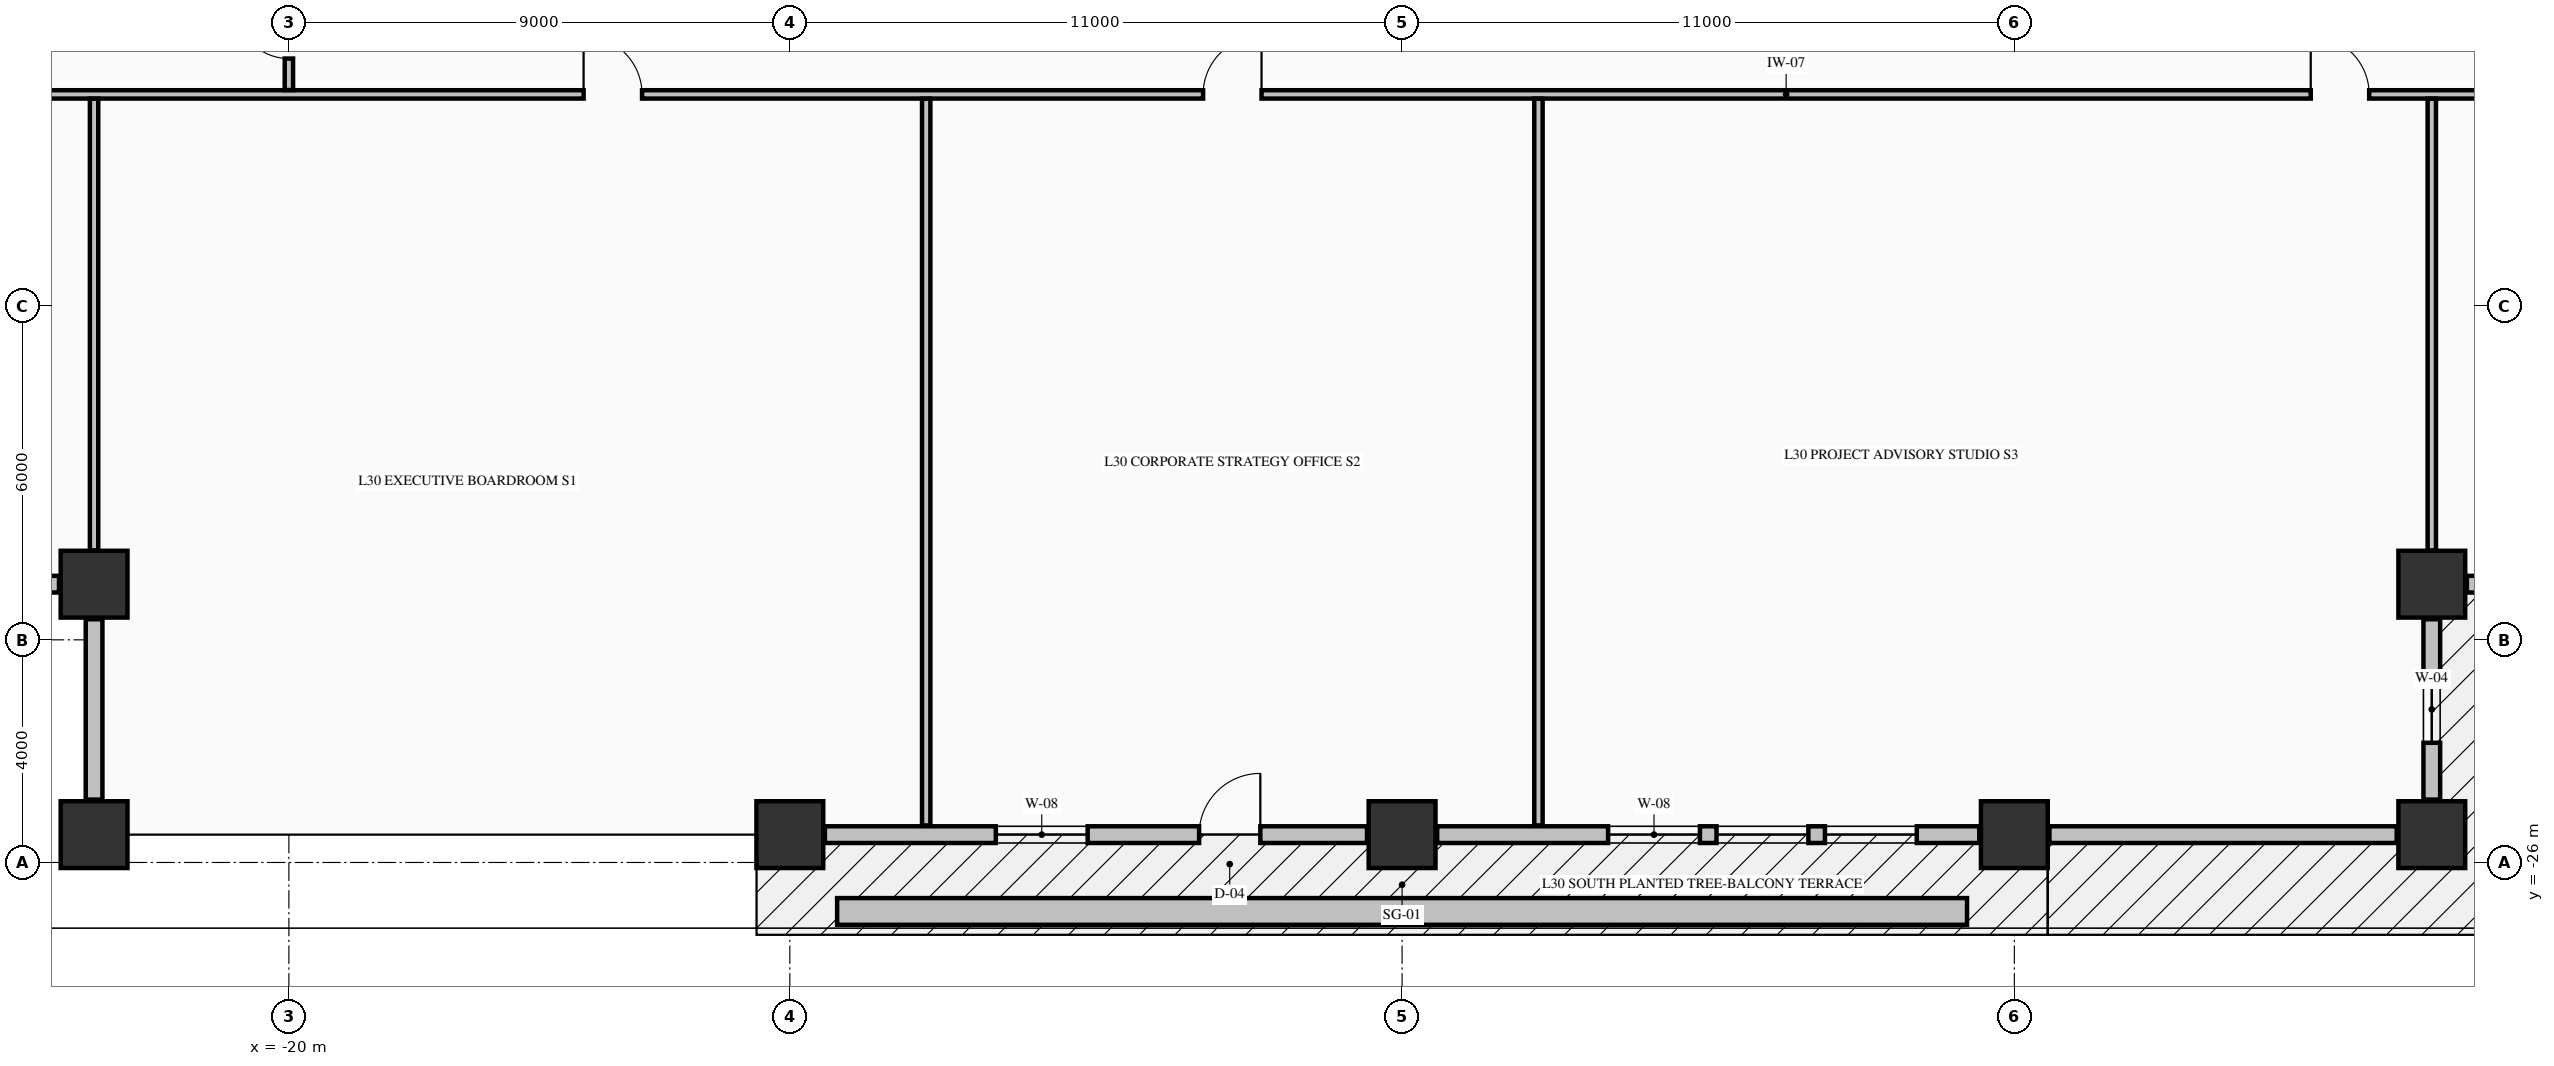
"""IFC4 building model, lengths in metres.
Left out: names, types, materials, properties, quantities, classifications, styles, units other than length and angle.
Written with IfcOpenShell. Run it as: python <this file> out.ifc"""

import sys

from ifc_helpers import new_model, si_unit, direction, frame, frame_2d, origin, origin_2d, place, context, subcontext, project, spatial, rectangle, extrude, element, fill, save


model = new_model("IFC4")
c1 = context("Model", 3, precision=1e-05, world=origin(), true_north=direction((0.0, 1.0)))
c2 = subcontext(c1, "Body", "Model", "MODEL_VIEW")
j1 = project(units=[si_unit("LENGTHUNIT", "METRE"), si_unit("PLANEANGLEUNIT", "RADIAN")], contexts=[c1])
p1 = place(None, origin())
s1 = spatial("IfcSite", under=j1, at=p1, CompositionType="ELEMENT")
p2 = place(p1, origin())
s2 = spatial("IfcBuilding", under=s1, at=p2, CompositionType="ELEMENT")
p3 = place(p2, frame((0.0, 0.0, 121.35)))
s3 = spatial("IfcBuildingStorey", under=s2, at=p3, CompositionType="ELEMENT", Elevation=121.35)
for number, where, z_axis, x_axis in (
    (1, (-23.5, -25.5, -0.425), (0.0, 0.0, 1.0), (1.0, 0.0, 0.0)),
    (2, (-11.0, -25.5, -0.425), (0.0, 0.0, 1.0), (1.0, 0.0, 0.0)),
    (3, (0.0, -25.5, -0.425), (0.0, 0.0, 1.0), (1.0, 0.0, 0.0)),
    (4, (11.0, -25.5, -0.425), (0.0, 0.0, 1.0), (1.0, 0.0, 0.0)),
    (5, (18.5, -25.5, -0.425), (0.0, 0.0, 1.0), (1.0, 0.0, 0.0)),
    (6, (-23.5, -21.0, -0.425), (0.0, 0.0, 1.0), (1.0, 0.0, 0.0)),
    (7, (18.5, -21.0, -0.425), (0.0, 0.0, 1.0), (1.0, 0.0, 0.0)),
):
    element("IfcColumn", number, at=place(p3, frame(where, z_axis=z_axis, x_axis=x_axis)), inside=s3, PredefinedType="COLUMN", context=c2, shape_type="SweptSolid", body=[
        extrude(rectangle(XDim=1.2, YDim=1.2, at=origin_2d()), origin(), (0.0, 0.0, 1.0), 3.745),
    ])
p4 = place(p3, frame((18.5, -24.87, 0.0), z_axis=(0.0, 0.0, 1.0), x_axis=(0.0, 1.0, 0.0)))
e8 = element("IfcWall", 8, at=p4, inside=s3, PredefinedType="STANDARD", context=c2, shape_type="SweptSolid", body=[
    extrude(rectangle(XDim=3.24, YDim=0.3, at=frame_2d((1.62, 0.0))), origin(), (0.0, 0.0, 1.0), 2.712),
])
p5 = place(p4, frame((1.02, 0.0, 0.82)))
e9 = element("IfcOpeningElement", 9, at=p5, cuts=e8, PredefinedType="OPENING", context=c2, shape_type="SweptSolid", body=[
    extrude(rectangle(XDim=1.2, YDim=1.65, at=frame_2d((0.6, 0.825))), frame((0.0, 0.16, 0.0), z_axis=(0.0, -1.0, 0.0), x_axis=(1.0, 0.0, 0.0)), (0.0, 0.0, 1.0), 0.32),
])
p6 = place(p3, frame((19.13, -21.0, 0.0), z_axis=(0.0, 0.0, 1.0), x_axis=(1.0, 0.0, 0.0)))
e10 = element("IfcWall", 10, at=p6, inside=s3, PredefinedType="STANDARD", context=c2, shape_type="SweptSolid", body=[
    extrude(rectangle(XDim=3.24, YDim=0.3, at=frame_2d((1.62, 0.0))), origin(), (0.0, 0.0, 1.0), 2.712),
])
p7 = place(p6, frame((1.02, 0.0, 0.82)))
e11 = element("IfcOpeningElement", 11, at=p7, cuts=e10, PredefinedType="OPENING", context=c2, shape_type="SweptSolid", body=[
    extrude(rectangle(XDim=1.2, YDim=1.65, at=frame_2d((0.6, 0.825))), frame((0.0, 0.16, 0.0), z_axis=(0.0, -1.0, 0.0), x_axis=(1.0, 0.0, 0.0)), (0.0, 0.0, 1.0), 0.32),
])
for number, where, z_axis, x_axis in (
    (12, (-27.37, -21.0, 0.0), (0.0, 0.0, 1.0), (1.0, 0.0, 0.0)),
    (13, (-23.5, -21.63, 0.0), (0.0, 0.0, 1.0), (0.0, -1.0, 0.0)),
):
    element("IfcWall", number, at=place(p3, frame(where, z_axis=z_axis, x_axis=x_axis)), inside=s3, PredefinedType="STANDARD", context=c2, shape_type="SweptSolid", body=[
        extrude(rectangle(XDim=3.24, YDim=0.3, at=frame_2d((1.62, 0.0))), origin(), (0.0, 0.0, 1.0), 1.512),
    ])
p8 = place(p3, frame((-10.37, -25.5, 0.0), z_axis=(0.0, 0.0, 1.0), x_axis=(1.0, 0.0, 0.0)))
e14 = element("IfcWall", 14, at=p8, inside=s3, PredefinedType="STANDARD", context=c2, shape_type="SweptSolid", body=[
    extrude(rectangle(XDim=9.74, YDim=0.3, at=frame_2d((4.87, 0.0))), origin(), (0.0, 0.0, 1.0), 2.712),
])
p9 = place(p8, frame((6.723, 0.0, 0.0)))
e15 = element("IfcOpeningElement", 15, at=p9, cuts=e14, PredefinedType="OPENING", context=c2, shape_type="SweptSolid", body=[
    extrude(rectangle(XDim=1.1, YDim=2.15, at=frame_2d((0.55, 1.075))), frame((0.0, 0.16, 0.0), z_axis=(0.0, -1.0, 0.0), x_axis=(1.0, 0.0, 0.0)), (0.0, 0.0, 1.0), 0.32),
])
p10 = place(p8, frame((3.071, 0.0, 0.8)))
e16 = element("IfcOpeningElement", 16, at=p10, cuts=e14, PredefinedType="OPENING", context=c2, shape_type="SweptSolid", body=[
    extrude(rectangle(XDim=1.65, YDim=1.7, at=frame_2d((0.825, 0.85))), frame((0.0, 0.16, 0.0), z_axis=(0.0, -1.0, 0.0), x_axis=(1.0, 0.0, 0.0)), (0.0, 0.0, 1.0), 0.32),
])
p11 = place(p3, frame((0.63, -25.5, 0.0), z_axis=(0.0, 0.0, 1.0), x_axis=(1.0, 0.0, 0.0)))
e17 = element("IfcWall", 17, at=p11, inside=s3, PredefinedType="STANDARD", context=c2, shape_type="SweptSolid", body=[
    extrude(rectangle(XDim=9.74, YDim=0.3, at=frame_2d((4.87, 0.0))), origin(), (0.0, 0.0, 1.0), 2.712),
])
p12 = place(p11, frame((3.071, 0.0, 0.8)))
e18 = element("IfcOpeningElement", 18, at=p12, cuts=e17, PredefinedType="OPENING", context=c2, shape_type="SweptSolid", body=[
    extrude(rectangle(XDim=1.65, YDim=1.7, at=frame_2d((0.825, 0.85))), frame((0.0, 0.16, 0.0), z_axis=(0.0, -1.0, 0.0), x_axis=(1.0, 0.0, 0.0)), (0.0, 0.0, 1.0), 0.32),
])
p13 = place(p11, frame((5.019, 0.0, 0.8)))
e19 = element("IfcOpeningElement", 19, at=p13, cuts=e17, PredefinedType="OPENING", context=c2, shape_type="SweptSolid", body=[
    extrude(rectangle(XDim=1.65, YDim=1.7, at=frame_2d((0.825, 0.85))), frame((0.0, 0.16, 0.0), z_axis=(0.0, -1.0, 0.0), x_axis=(1.0, 0.0, 0.0)), (0.0, 0.0, 1.0), 0.32),
])
p14 = place(p11, frame((6.967, 0.0, 0.8)))
e20 = element("IfcOpeningElement", 20, at=p14, cuts=e17, PredefinedType="OPENING", context=c2, shape_type="SweptSolid", body=[
    extrude(rectangle(XDim=1.65, YDim=1.7, at=frame_2d((0.825, 0.85))), frame((0.0, 0.16, 0.0), z_axis=(0.0, -1.0, 0.0), x_axis=(1.0, 0.0, 0.0)), (0.0, 0.0, 1.0), 0.32),
])
p15 = place(p3, frame((11.63, -25.5, 0.0), z_axis=(0.0, 0.0, 1.0), x_axis=(1.0, 0.0, 0.0)))
e21 = element("IfcWall", 21, at=p15, inside=s3, PredefinedType="STANDARD", context=c2, shape_type="SweptSolid", body=[
    extrude(rectangle(XDim=6.24, YDim=0.3, at=frame_2d((3.12, 0.0))), origin(), (0.0, 0.0, 1.0), 2.712),
])
p16 = place(p3, frame((-27.835, -12.2, 0.0), z_axis=(0.0, 0.0, 1.0), x_axis=(1.0, 0.0, 0.0)))
e22 = element("IfcWall", 22, at=p16, inside=s3, PredefinedType="PARTITIONING", context=c2, shape_type="SweptSolid", body=[
    extrude(rectangle(XDim=50.67, YDim=0.15, at=frame_2d((25.335, 0.0))), origin(), (0.0, 0.0, 1.0), 3.32),
])
p17 = place(p16, frame((13.13, 0.0, 0.0)))
e23 = element("IfcOpeningElement", 23, at=p17, cuts=e22, PredefinedType="OPENING", context=c2, shape_type="SweptSolid", body=[
    extrude(rectangle(XDim=1.05, YDim=2.15, at=frame_2d((0.525, 1.075))), frame((0.0, 0.085, 0.0), z_axis=(0.0, -1.0, 0.0), x_axis=(1.0, 0.0, 0.0)), (0.0, 0.0, 1.0), 0.17),
])
p18 = place(p16, frame((24.26, 0.0, 0.0)))
e24 = element("IfcOpeningElement", 24, at=p18, cuts=e22, PredefinedType="OPENING", context=c2, shape_type="SweptSolid", body=[
    extrude(rectangle(XDim=1.05, YDim=2.15, at=frame_2d((0.525, 1.075))), frame((0.0, 0.085, 0.0), z_axis=(0.0, -1.0, 0.0), x_axis=(1.0, 0.0, 0.0)), (0.0, 0.0, 1.0), 0.17),
])
p19 = place(p16, frame((44.16, 0.0, 0.0)))
e25 = element("IfcOpeningElement", 25, at=p19, cuts=e22, PredefinedType="OPENING", context=c2, shape_type="SweptSolid", body=[
    extrude(rectangle(XDim=1.05, YDim=2.15, at=frame_2d((0.525, 1.075))), frame((0.0, 0.085, 0.0), z_axis=(0.0, -1.0, 0.0), x_axis=(1.0, 0.0, 0.0)), (0.0, 0.0, 1.0), 0.17),
])
p20 = place(p3, frame((-23.5, -20.394, 0.0), z_axis=(0.0, 0.0, 1.0), x_axis=(0.0, 1.0, 0.0)))
e26 = element("IfcWall", 26, at=p20, inside=s3, PredefinedType="PARTITIONING", context=c2, shape_type="SweptSolid", body=[
    extrude(rectangle(XDim=8.116, YDim=0.15, at=frame_2d((4.058, 0.0))), origin(), (0.0, 0.0, 1.0), 3.32),
])
p21 = place(p3, frame((-20.0, -12.122, 0.0), z_axis=(0.0, 0.0, 1.0), x_axis=(0.0, 1.0, 0.0)))
e27 = element("IfcWall", 27, at=p21, inside=s3, PredefinedType="PARTITIONING", context=c2, shape_type="SweptSolid", body=[
    extrude(rectangle(XDim=1.666, YDim=0.15, at=frame_2d((0.833, 0.0))), origin(), (0.0, 0.0, 1.0), 2.81),
])
p22 = place(p21, frame((0.566, 0.0, 0.0)))
e28 = element("IfcOpeningElement", 28, at=p22, cuts=e27, PredefinedType="OPENING", context=c2, shape_type="SweptSolid", body=[
    extrude(rectangle(XDim=0.95, YDim=2.15, at=frame_2d((0.475, 1.075))), frame((0.0, 0.085, 0.0), z_axis=(0.0, -1.0, 0.0), x_axis=(1.0, 0.0, 0.0)), (0.0, 0.0, 1.0), 0.17),
])
for number, where, z_axis, x_axis in (
    (29, (-8.55, -25.335, 0.0), (0.0, 0.0, 1.0), (0.0, 1.0, 0.0)),
    (30, (2.45, -25.335, 0.0), (0.0, 0.0, 1.0), (0.0, 1.0, 0.0)),
):
    element("IfcWall", number, at=place(p3, frame(where, z_axis=z_axis, x_axis=x_axis)), inside=s3, PredefinedType="PARTITIONING", context=c2, shape_type="SweptSolid", body=[
        extrude(rectangle(XDim=13.057, YDim=0.15, at=frame_2d((6.528, 0.0))), origin(), (0.0, 0.0, 1.0), 3.32),
    ])
p23 = place(p3, frame((18.5, -20.394, 0.0), z_axis=(0.0, 0.0, 1.0), x_axis=(0.0, 1.0, 0.0)))
e31 = element("IfcWall", 31, at=p23, inside=s3, PredefinedType="PARTITIONING", context=c2, shape_type="SweptSolid", body=[
    extrude(rectangle(XDim=8.116, YDim=0.15, at=frame_2d((4.058, 0.0))), origin(), (0.0, 0.0, 1.0), 3.32),
])
p24 = place(p3, frame((-10.15, -26.88, -0.04), z_axis=(0.0, 0.0, 1.0), x_axis=(1.0, 0.0, 0.0)))
e32 = element("IfcWall", 32, at=p24, inside=s3, PredefinedType="PARAPET", context=c2, shape_type="SweptSolid", body=[
    extrude(rectangle(XDim=20.3, YDim=0.48, at=frame_2d((10.15, 0.0))), origin(), (0.0, 0.0, 1.0), 0.52),
])
p25 = place(p5, origin())
e33 = element("IfcWindow", 33, at=p25, inside=s3, PartitioningType="SINGLE_PANEL", PredefinedType="WINDOW", context=c2, shape_type="SweptSolid", body=[
    extrude(rectangle(XDim=1.2, YDim=1.65, at=frame_2d((0.6, 0.825))), frame((0.0, 0.03, 0.0), z_axis=(0.0, -1.0, 0.0), x_axis=(1.0, 0.0, 0.0)), (0.0, 0.0, 1.0), 0.06),
])
fill(e9, e33)
p26 = place(p9, origin())
e34 = element("IfcDoor", 34, at=p26, inside=s3, OperationType="SINGLE_SWING_RIGHT", PredefinedType="DOOR", context=c2, shape_type="SweptSolid", body=[
    extrude(rectangle(XDim=1.1, YDim=2.15, at=frame_2d((0.55, 1.075))), frame((0.0, 0.025, 0.0), z_axis=(0.0, -1.0, 0.0), x_axis=(1.0, 0.0, 0.0)), (0.0, 0.0, 1.0), 0.05),
])
fill(e15, e34)
p27 = place(p10, origin())
e35 = element("IfcWindow", 35, at=p27, inside=s3, PartitioningType="SINGLE_PANEL", PredefinedType="WINDOW", context=c2, shape_type="SweptSolid", body=[
    extrude(rectangle(XDim=1.65, YDim=1.7, at=frame_2d((0.825, 0.85))), frame((0.0, 0.03, 0.0), z_axis=(0.0, -1.0, 0.0), x_axis=(1.0, 0.0, 0.0)), (0.0, 0.0, 1.0), 0.06),
])
fill(e16, e35)
p28 = place(p12, origin())
e36 = element("IfcWindow", 36, at=p28, inside=s3, PartitioningType="SINGLE_PANEL", PredefinedType="WINDOW", context=c2, shape_type="SweptSolid", body=[
    extrude(rectangle(XDim=1.65, YDim=1.7, at=frame_2d((0.825, 0.85))), frame((0.0, 0.03, 0.0), z_axis=(0.0, -1.0, 0.0), x_axis=(1.0, 0.0, 0.0)), (0.0, 0.0, 1.0), 0.06),
])
fill(e18, e36)
p29 = place(p13, origin())
e37 = element("IfcWindow", 37, at=p29, inside=s3, PartitioningType="SINGLE_PANEL", PredefinedType="WINDOW", context=c2, shape_type="SweptSolid", body=[
    extrude(rectangle(XDim=1.65, YDim=1.7, at=frame_2d((0.825, 0.85))), frame((0.0, 0.03, 0.0), z_axis=(0.0, -1.0, 0.0), x_axis=(1.0, 0.0, 0.0)), (0.0, 0.0, 1.0), 0.06),
])
fill(e19, e37)
p30 = place(p14, origin())
e38 = element("IfcWindow", 38, at=p30, inside=s3, PartitioningType="SINGLE_PANEL", PredefinedType="WINDOW", context=c2, shape_type="SweptSolid", body=[
    extrude(rectangle(XDim=1.65, YDim=1.7, at=frame_2d((0.825, 0.85))), frame((0.0, 0.03, 0.0), z_axis=(0.0, -1.0, 0.0), x_axis=(1.0, 0.0, 0.0)), (0.0, 0.0, 1.0), 0.06),
])
fill(e20, e38)
p31 = place(p17, origin())
e39 = element("IfcDoor", 39, at=p31, inside=s3, OperationType="SINGLE_SWING_LEFT", PredefinedType="DOOR", context=c2, shape_type="SweptSolid", body=[
    extrude(rectangle(XDim=1.05, YDim=2.15, at=frame_2d((0.525, 1.075))), frame((0.0, 0.025, 0.0), z_axis=(0.0, -1.0, 0.0), x_axis=(1.0, 0.0, 0.0)), (0.0, 0.0, 1.0), 0.05),
])
fill(e23, e39)
p32 = place(p18, origin())
e40 = element("IfcDoor", 40, at=p32, inside=s3, OperationType="SINGLE_SWING_RIGHT", PredefinedType="DOOR", context=c2, shape_type="SweptSolid", body=[
    extrude(rectangle(XDim=1.05, YDim=2.15, at=frame_2d((0.525, 1.075))), frame((0.0, 0.025, 0.0), z_axis=(0.0, -1.0, 0.0), x_axis=(1.0, 0.0, 0.0)), (0.0, 0.0, 1.0), 0.05),
])
fill(e24, e40)
p33 = place(p19, origin())
e41 = element("IfcDoor", 41, at=p33, inside=s3, OperationType="SINGLE_SWING_LEFT", PredefinedType="DOOR", context=c2, shape_type="SweptSolid", body=[
    extrude(rectangle(XDim=1.05, YDim=2.15, at=frame_2d((0.525, 1.075))), frame((0.0, 0.025, 0.0), z_axis=(0.0, -1.0, 0.0), x_axis=(1.0, 0.0, 0.0)), (0.0, 0.0, 1.0), 0.05),
])
fill(e25, e41)
p34 = place(p22, origin())
e42 = element("IfcDoor", 42, at=p34, inside=s3, OperationType="SINGLE_SWING_RIGHT", PredefinedType="DOOR", context=c2, shape_type="SweptSolid", body=[
    extrude(rectangle(XDim=0.95, YDim=2.15, at=frame_2d((0.475, 1.075))), frame((0.0, 0.025, 0.0), z_axis=(0.0, -1.0, 0.0), x_axis=(1.0, 0.0, 0.0)), (0.0, 0.0, 1.0), 0.05),
])
fill(e28, e42)
save(model, sys.argv[1])
